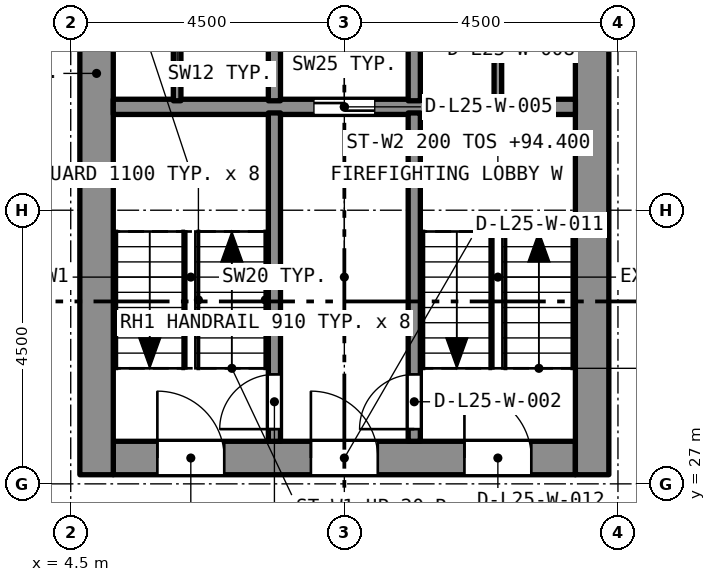
"""IFC4 building model, lengths in metres.
Left out: names, types, materials, properties, quantities, classifications, styles, units other than length and angle.
Written with IfcOpenShell. Run it as: python <this file> out.ifc"""

import sys

from ifc_helpers import new_model, si_unit, direction, frame, frame_2d, origin, place, context, subcontext, project, spatial, rectangle, extrude, element, fill, save


model = new_model("IFC4")
c1 = context("Model", 3, precision=1e-05, world=origin(), true_north=direction((0.0, 1.0)))
c2 = subcontext(c1, "Body", "Model", "MODEL_VIEW")
j1 = project(units=[si_unit("LENGTHUNIT", "METRE"), si_unit("PLANEANGLEUNIT", "RADIAN")], contexts=[c1])
p1 = place(None, origin())
s1 = spatial("IfcSite", under=j1, at=p1, CompositionType="ELEMENT")
p2 = place(p1, origin())
s2 = spatial("IfcBuilding", under=s1, at=p2, CompositionType="ELEMENT")
p3 = place(p2, frame((0.0, 0.0, 92.8)))
s3 = spatial("IfcBuildingStorey", under=s2, at=p3, CompositionType="ELEMENT", Elevation=92.8)
p4 = place(p3, frame((5.2, 27.425, 0.0), z_axis=(0.0, 0.0, 1.0), x_axis=(1.0, 0.0, 0.0)))
e1 = element("IfcWall", 1, at=p4, inside=s3, PredefinedType="SOLIDWALL", context=c2, shape_type="SweptSolid", body=[
    extrude(rectangle(XDim=7.6, YDim=0.55, at=frame_2d((3.8, 0.0))), origin(), (0.0, 0.0, 1.0), 3.2),
])
p5 = place(p4, frame((0.725, 0.0, 0.0)))
e2 = element("IfcOpeningElement", 2, at=p5, cuts=e1, PredefinedType="OPENING", context=c2, shape_type="SweptSolid", body=[
    extrude(rectangle(XDim=1.1, YDim=2.1, at=frame_2d((0.55, 1.05))), frame((0.0, 0.285, 0.0), z_axis=(0.0, -1.0, 0.0), x_axis=(1.0, 0.0, 0.0)), (0.0, 0.0, 1.0), 0.57),
])
p6 = place(p4, frame((3.25, 0.0, 0.0)))
e3 = element("IfcOpeningElement", 3, at=p6, cuts=e1, PredefinedType="OPENING", context=c2, shape_type="SweptSolid", body=[
    extrude(rectangle(XDim=1.1, YDim=2.1, at=frame_2d((0.55, 1.05))), frame((0.0, 0.285, 0.0), z_axis=(0.0, -1.0, 0.0), x_axis=(1.0, 0.0, 0.0)), (0.0, 0.0, 1.0), 0.57),
])
p7 = place(p4, frame((5.775, 0.0, 0.0)))
e4 = element("IfcOpeningElement", 4, at=p7, cuts=e1, PredefinedType="OPENING", context=c2, shape_type="SweptSolid", body=[
    extrude(rectangle(XDim=1.1, YDim=2.1, at=frame_2d((0.55, 1.05))), frame((0.0, 0.285, 0.0), z_axis=(0.0, -1.0, 0.0), x_axis=(1.0, 0.0, 0.0)), (0.0, 0.0, 1.0), 0.57),
])
p8 = place(p3, frame((4.925, 27.15, 0.0), z_axis=(0.0, 0.0, 1.0), x_axis=(0.0, 1.0, 0.0)))
e5 = element("IfcWall", 5, at=p8, inside=s3, PredefinedType="SOLIDWALL", context=c2, shape_type="SweptSolid", body=[
    extrude(rectangle(XDim=13.2, YDim=0.55, at=frame_2d((6.6, 0.0))), origin(), (0.0, 0.0, 1.0), 3.2),
])
p9 = place(p8, frame((8.8, 0.0, 0.0)))
e6 = element("IfcOpeningElement", 6, at=p9, cuts=e5, PredefinedType="OPENING", context=c2, shape_type="SweptSolid", body=[
    extrude(rectangle(XDim=1.2, YDim=2.1, at=frame_2d((0.6, 1.05))), frame((0.0, 0.285, 0.0), z_axis=(0.0, -1.0, 0.0), x_axis=(1.0, 0.0, 0.0)), (0.0, 0.0, 1.0), 0.57),
])
p10 = place(p3, frame((13.075, 27.15, 0.0), z_axis=(0.0, 0.0, 1.0), x_axis=(0.0, 1.0, 0.0)))
e7 = element("IfcWall", 7, at=p10, inside=s3, PredefinedType="SOLIDWALL", context=c2, shape_type="SweptSolid", body=[
    extrude(rectangle(XDim=13.2, YDim=0.55, at=frame_2d((6.6, 0.0))), origin(), (0.0, 0.0, 1.0), 3.2),
])
p11 = place(p10, frame((10.95, 0.0, 0.0)))
e8 = element("IfcOpeningElement", 8, at=p11, cuts=e7, PredefinedType="OPENING", context=c2, shape_type="SweptSolid", body=[
    extrude(rectangle(XDim=1.1, YDim=2.1, at=frame_2d((0.55, 1.05))), frame((0.0, 0.285, 0.0), z_axis=(0.0, -1.0, 0.0), x_axis=(1.0, 0.0, 0.0)), (0.0, 0.0, 1.0), 0.57),
])
p12 = place(p10, frame((8.8, 0.0, 0.0)))
e9 = element("IfcOpeningElement", 9, at=p12, cuts=e7, PredefinedType="OPENING", context=c2, shape_type="SweptSolid", body=[
    extrude(rectangle(XDim=1.2, YDim=2.1, at=frame_2d((0.6, 1.05))), frame((0.0, 0.285, 0.0), z_axis=(0.0, -1.0, 0.0), x_axis=(1.0, 0.0, 0.0)), (0.0, 0.0, 1.0), 0.57),
])
p13 = place(p3, frame((5.2, 33.2, 0.0), z_axis=(0.0, 0.0, 1.0), x_axis=(1.0, 0.0, 0.0)))
e10 = element("IfcWall", 10, at=p13, inside=s3, PredefinedType="SOLIDWALL", context=c2, shape_type="SweptSolid", body=[
    extrude(rectangle(XDim=7.6, YDim=0.25, at=frame_2d((3.8, 0.0))), origin(), (0.0, 0.0, 1.0), 2.9),
])
p14 = place(p13, frame((3.3, 0.0, 0.0)))
e11 = element("IfcOpeningElement", 11, at=p14, cuts=e10, PredefinedType="OPENING", context=c2, shape_type="SweptSolid", body=[
    extrude(rectangle(XDim=1.0, YDim=2.1, at=frame_2d((0.5, 1.05))), frame((0.0, 0.135, 0.0), z_axis=(0.0, -1.0, 0.0), x_axis=(1.0, 0.0, 0.0)), (0.0, 0.0, 1.0), 0.27),
])
p15 = place(p3, frame((7.85, 27.7, 0.0), z_axis=(0.0, 0.0, 1.0), x_axis=(0.0, 1.0, 0.0)))
e12 = element("IfcWall", 12, at=p15, inside=s3, PredefinedType="SOLIDWALL", context=c2, shape_type="SweptSolid", body=[
    extrude(rectangle(XDim=5.4, YDim=0.2, at=frame_2d((2.7, 0.0))), origin(), (0.0, 0.0, 1.0), 2.9),
])
p16 = place(p15, frame((0.2, 0.0, 0.0)))
e13 = element("IfcOpeningElement", 13, at=p16, cuts=e12, PredefinedType="OPENING", context=c2, shape_type="SweptSolid", body=[
    extrude(rectangle(XDim=0.9, YDim=2.1, at=frame_2d((0.45, 1.05))), frame((0.0, 0.11, 0.0), z_axis=(0.0, -1.0, 0.0), x_axis=(1.0, 0.0, 0.0)), (0.0, 0.0, 1.0), 0.22),
])
p17 = place(p3, frame((10.15, 27.7, 0.0), z_axis=(0.0, 0.0, 1.0), x_axis=(0.0, 1.0, 0.0)))
e14 = element("IfcWall", 14, at=p17, inside=s3, PredefinedType="SOLIDWALL", context=c2, shape_type="SweptSolid", body=[
    extrude(rectangle(XDim=5.4, YDim=0.2, at=frame_2d((2.7, 0.0))), origin(), (0.0, 0.0, 1.0), 2.9),
])
p18 = place(p17, frame((0.2, 0.0, 0.0)))
e15 = element("IfcOpeningElement", 15, at=p18, cuts=e14, PredefinedType="OPENING", context=c2, shape_type="SweptSolid", body=[
    extrude(rectangle(XDim=0.9, YDim=2.1, at=frame_2d((0.45, 1.05))), frame((0.0, 0.11, 0.0), z_axis=(0.0, -1.0, 0.0), x_axis=(1.0, 0.0, 0.0)), (0.0, 0.0, 1.0), 0.22),
])
for number, where, z_axis, x_axis in (
    (16, (7.85, 33.3, 0.0), (0.0, 0.0, 1.0), (0.0, 1.0, 0.0)),
    (17, (10.15, 33.3, 0.0), (0.0, 0.0, 1.0), (0.0, 1.0, 0.0)),
):
    element("IfcWall", number, at=place(p3, frame(where, z_axis=z_axis, x_axis=x_axis)), inside=s3, PredefinedType="SOLIDWALL", context=c2, shape_type="SweptSolid", body=[
        extrude(rectangle(XDim=2.3, YDim=0.2, at=frame_2d((1.15, 0.0))), origin(), (0.0, 0.0, 1.0), 2.9),
    ])
for number, where, z_axis, x_axis in (
    (18, (6.25, 33.3, 0.0), (0.0, 0.0, 1.0), (0.0, 1.0, 0.0)),
    (19, (11.525, 33.3, 0.0), (0.0, 0.0, 1.0), (0.0, 1.0, 0.0)),
):
    element("IfcWall", number, at=place(p3, frame(where, z_axis=z_axis, x_axis=x_axis)), inside=s3, PredefinedType="PARTITIONING", context=c2, shape_type="SweptSolid", body=[
        extrude(rectangle(XDim=2.3, YDim=0.125, at=frame_2d((1.15, 0.0))), origin(), (0.0, 0.0, 1.0), 2.9),
    ])
p19 = place(p16, origin())
e20 = element("IfcDoor", 20, at=p19, inside=s3, OperationType="SINGLE_SWING_LEFT", PredefinedType="DOOR", context=c2, shape_type="SweptSolid", body=[
    extrude(rectangle(XDim=0.9, YDim=2.1, at=frame_2d((0.45, 1.05))), frame((0.0, 0.025, 0.0), z_axis=(0.0, -1.0, 0.0), x_axis=(1.0, 0.0, 0.0)), (0.0, 0.0, 1.0), 0.05),
])
fill(e13, e20)
p20 = place(p18, origin())
e21 = element("IfcDoor", 21, at=p20, inside=s3, OperationType="SINGLE_SWING_LEFT", PredefinedType="DOOR", context=c2, shape_type="SweptSolid", body=[
    extrude(rectangle(XDim=0.9, YDim=2.1, at=frame_2d((0.45, 1.05))), frame((0.0, 0.025, 0.0), z_axis=(0.0, -1.0, 0.0), x_axis=(1.0, 0.0, 0.0)), (0.0, 0.0, 1.0), 0.05),
])
fill(e15, e21)
p21 = place(p14, origin())
e22 = element("IfcDoor", 22, at=p21, inside=s3, OperationType="SLIDING_TO_LEFT", PredefinedType="DOOR", context=c2, shape_type="SweptSolid", body=[
    extrude(rectangle(XDim=1.0, YDim=2.1, at=frame_2d((0.5, 1.05))), frame((0.0, 0.025, 0.0), z_axis=(0.0, -1.0, 0.0), x_axis=(1.0, 0.0, 0.0)), (0.0, 0.0, 1.0), 0.05),
])
fill(e11, e22)
p22 = place(p5, origin())
e23 = element("IfcDoor", 23, at=p22, inside=s3, OperationType="SINGLE_SWING_LEFT", PredefinedType="DOOR", context=c2, shape_type="SweptSolid", body=[
    extrude(rectangle(XDim=1.1, YDim=2.1, at=frame_2d((0.55, 1.05))), frame((0.0, 0.025, 0.0), z_axis=(0.0, -1.0, 0.0), x_axis=(1.0, 0.0, 0.0)), (0.0, 0.0, 1.0), 0.05),
])
fill(e2, e23)
p23 = place(p6, origin())
e24 = element("IfcDoor", 24, at=p23, inside=s3, OperationType="SINGLE_SWING_LEFT", PredefinedType="DOOR", context=c2, shape_type="SweptSolid", body=[
    extrude(rectangle(XDim=1.1, YDim=2.1, at=frame_2d((0.55, 1.05))), frame((0.0, 0.025, 0.0), z_axis=(0.0, -1.0, 0.0), x_axis=(1.0, 0.0, 0.0)), (0.0, 0.0, 1.0), 0.05),
])
fill(e3, e24)
p24 = place(p7, origin())
e25 = element("IfcDoor", 25, at=p24, inside=s3, OperationType="SINGLE_SWING_LEFT", PredefinedType="DOOR", context=c2, shape_type="SweptSolid", body=[
    extrude(rectangle(XDim=1.1, YDim=2.1, at=frame_2d((0.55, 1.05))), frame((0.0, 0.025, 0.0), z_axis=(0.0, -1.0, 0.0), x_axis=(1.0, 0.0, 0.0)), (0.0, 0.0, 1.0), 0.05),
])
fill(e4, e25)
save(model, sys.argv[1])
